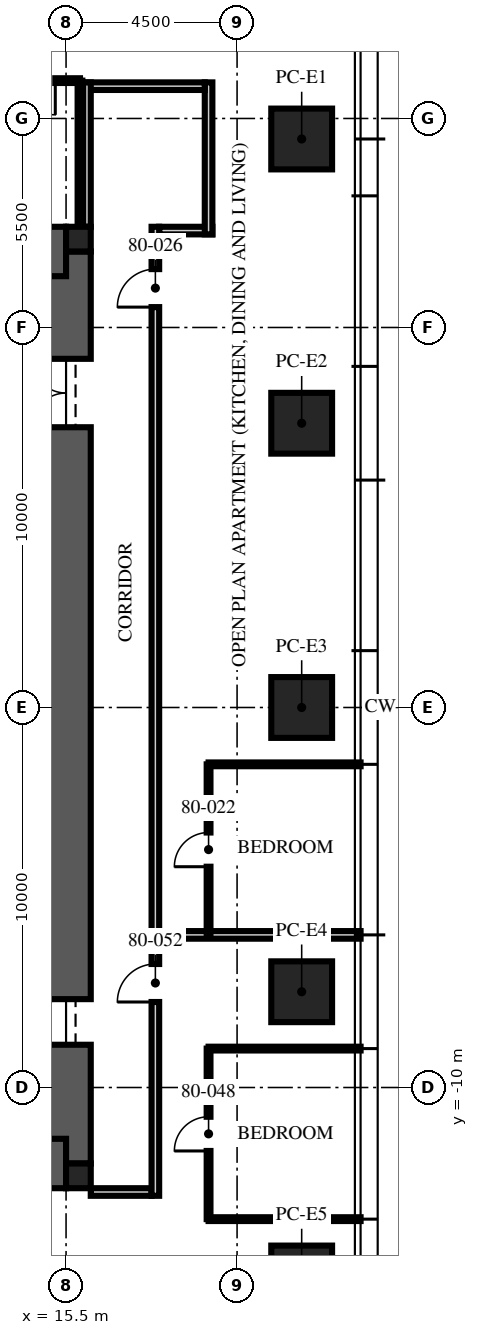
"""IFC4 building model, lengths in metres.
Left out: names, types, materials, properties, quantities, classifications, styles, units other than length and angle.
Written with IfcOpenShell. Run it as: python <this file> out.ifc"""

import sys

from ifc_helpers import new_model, si_unit, direction, frame, frame_2d, origin, origin_2d, place, context, subcontext, project, spatial, rectangle, extrude, element, fill, save


model = new_model("IFC4")
c1 = context("Model", 3, precision=1e-05, world=origin(), true_north=direction((0.0, 1.0)))
c2 = subcontext(c1, "Body", "Model", "MODEL_VIEW")
j1 = project(units=[si_unit("LENGTHUNIT", "METRE"), si_unit("PLANEANGLEUNIT", "RADIAN")], contexts=[c1])
p1 = place(None, origin())
s1 = spatial("IfcSite", under=j1, at=p1, CompositionType="ELEMENT")
p2 = place(p1, origin())
s2 = spatial("IfcBuilding", under=s1, at=p2, CompositionType="ELEMENT")
p3 = place(p2, frame((0.0, 0.0, 319.5)))
s3 = spatial("IfcBuildingStorey", under=s2, at=p3, CompositionType="ELEMENT", Elevation=319.5)
p4 = place(p3, frame((15.5, -12.0, -0.25), z_axis=(0.0, 0.0, 1.0), x_axis=(0.0, 1.0, 0.0)))
e1 = element("IfcWall", 1, at=p4, inside=s3, PredefinedType="SHEAR", context=c2, shape_type="SweptSolid", body=[
    extrude(rectangle(XDim=24.0, YDim=1.3, at=frame_2d((12.0, 0.0))), origin(), (0.0, 0.0, 1.0), 3.75),
])
p5 = place(p4, frame((3.125, 0.0, 0.25)))
e2 = element("IfcOpeningElement", 2, at=p5, cuts=e1, PredefinedType="OPENING", context=c2, shape_type="SweptSolid", body=[
    extrude(rectangle(XDim=1.2, YDim=2.1, at=frame_2d((0.6, 1.05))), frame((0.0, 0.66, 0.0), z_axis=(0.0, -1.0, 0.0), x_axis=(1.0, 0.0, 0.0)), (0.0, 0.0, 1.0), 1.32),
])
p6 = place(p4, frame((19.375, 0.0, 0.25)))
e3 = element("IfcOpeningElement", 3, at=p6, cuts=e1, PredefinedType="OPENING", context=c2, shape_type="SweptSolid", body=[
    extrude(rectangle(XDim=1.8, YDim=2.1, at=frame_2d((0.9, 1.05))), frame((0.0, 0.66, 0.0), z_axis=(0.0, -1.0, 0.0), x_axis=(1.0, 0.0, 0.0)), (0.0, 0.0, 1.0), 1.32),
])
for number, where, z_axis, x_axis in (
    (4, (-15.5, 12.0, -0.25), (0.0, 0.0, 1.0), (1.0, 0.0, 0.0)),
    (5, (-15.5, -12.0, -0.25), (0.0, 0.0, 1.0), (1.0, 0.0, 0.0)),
):
    element("IfcWall", number, at=place(p3, frame(where, z_axis=z_axis, x_axis=x_axis)), inside=s3, PredefinedType="SHEAR", context=c2, shape_type="SweptSolid", body=[
        extrude(rectangle(XDim=31.0, YDim=1.3, at=frame_2d((15.5, 0.0))), origin(), (0.0, 0.0, 1.0), 3.75),
    ])
for number, where, z_axis, x_axis in (
    (6, (15.825, 12.325, -0.25), (0.0, 0.0, 1.0), (1.0, 0.0, 0.0)),
    (7, (15.825, -12.325, -0.25), (0.0, 0.0, 1.0), (1.0, 0.0, 0.0)),
):
    element("IfcColumn", number, at=place(p3, frame(where, z_axis=z_axis, x_axis=x_axis)), inside=s3, PredefinedType="COLUMN", context=c2, shape_type="SweptSolid", body=[
        extrude(rectangle(XDim=0.65, YDim=0.65, at=origin_2d()), origin(), (0.0, 0.0, 1.0), 3.75),
    ])
for number, where, z_axis, x_axis in (
    (8, (21.7, 14.96, 0.0), (0.0, 0.0, 1.0), (0.0, 1.0, 0.0)),
    (9, (21.7, 7.48, 0.0), (0.0, 0.0, 1.0), (0.0, 1.0, 0.0)),
    (10, (21.7, 0.0, 0.0), (0.0, 0.0, 1.0), (0.0, 1.0, 0.0)),
    (11, (21.7, -7.48, 0.0), (0.0, 0.0, 1.0), (0.0, 1.0, 0.0)),
    (12, (21.7, -14.96, 0.0), (0.0, 0.0, 1.0), (0.0, 1.0, 0.0)),
):
    element("IfcColumn", number, at=place(p3, frame(where, z_axis=z_axis, x_axis=x_axis)), inside=s3, PredefinedType="COLUMN", context=c2, shape_type="SweptSolid", body=[
        extrude(rectangle(XDim=1.6, YDim=1.6, at=origin_2d()), origin(), (0.0, 0.0, 1.0), 3.75),
    ])
p7 = place(p3, frame((17.95, 12.55, 0.0), z_axis=(0.0, 0.0, 1.0), x_axis=(1.0, 0.0, 0.0)))
e13 = element("IfcWall", 13, at=p7, inside=s3, PredefinedType="PARTITIONING", context=c2, shape_type="SweptSolid", body=[
    extrude(rectangle(XDim=1.4, YDim=0.2, at=frame_2d((0.7, 0.0))), origin(), (0.0, 0.0, 1.0), 3.5),
])
p8 = place(p3, frame((19.25, 12.45, 0.0), z_axis=(0.0, 0.0, 1.0), x_axis=(0.0, 1.0, 0.0)))
e14 = element("IfcWall", 14, at=p8, inside=s3, PredefinedType="PARTITIONING", context=c2, shape_type="SweptSolid", body=[
    extrude(rectangle(XDim=4.0, YDim=0.2, at=frame_2d((2.0, 0.0))), origin(), (0.0, 0.0, 1.0), 2.9),
])
p9 = place(p3, frame((19.15, 16.35, 0.0), z_axis=(0.0, 0.0, 1.0), x_axis=(-1.0, 0.0, 0.0)))
e15 = element("IfcWall", 15, at=p9, inside=s3, PredefinedType="PARTITIONING", context=c2, shape_type="SweptSolid", body=[
    extrude(rectangle(XDim=3.2, YDim=0.2, at=frame_2d((1.6, 0.0))), origin(), (0.0, 0.0, 1.0), 2.6),
])
p10 = place(p3, frame((16.05, 16.45, 0.0), z_axis=(0.0, 0.0, 1.0), x_axis=(0.0, -1.0, 0.0)))
e16 = element("IfcWall", 16, at=p10, inside=s3, PredefinedType="PARTITIONING", context=c2, shape_type="SweptSolid", body=[
    extrude(rectangle(XDim=3.8, YDim=0.2, at=frame_2d((1.9, 0.0))), origin(), (0.0, 0.0, 1.0), 2.6),
])
p11 = place(p3, frame((16.15, -12.75, 0.0), z_axis=(0.0, 0.0, 1.0), x_axis=(1.0, 0.0, 0.0)))
e17 = element("IfcWall", 17, at=p11, inside=s3, PredefinedType="PARTITIONING", context=c2, shape_type="SweptSolid", body=[
    extrude(rectangle(XDim=1.6, YDim=0.2, at=frame_2d((0.8, 0.0))), origin(), (0.0, 0.0, 1.0), 2.6),
])
p12 = place(p3, frame((17.95, -5.984, 0.0), z_axis=(0.0, 0.0, 1.0), x_axis=(1.0, 0.0, 0.0)))
e18 = element("IfcWall", 18, at=p12, inside=s3, PredefinedType="PARTITIONING", context=c2, shape_type="SweptSolid", body=[
    extrude(rectangle(XDim=5.3, YDim=0.2, at=frame_2d((2.65, 0.0))), origin(), (0.0, 0.0, 1.0), 3.01),
])
for number, where, z_axis, x_axis in (
    (19, (19.25, -1.496, 0.0), (0.0, 0.0, 1.0), (1.0, 0.0, 0.0)),
    (20, (19.25, -13.464, 0.0), (0.0, 0.0, 1.0), (1.0, 0.0, 0.0)),
    (21, (19.25, -8.976, 0.0), (0.0, 0.0, 1.0), (1.0, 0.0, 0.0)),
):
    element("IfcWall", number, at=place(p3, frame(where, z_axis=z_axis, x_axis=x_axis)), inside=s3, PredefinedType="PARTITIONING", context=c2, shape_type="SweptSolid", body=[
        extrude(rectangle(XDim=4.0, YDim=0.1, at=frame_2d((2.0, 0.0))), origin(), (0.0, 0.0, 1.0), 3.01),
    ])
p13 = place(p3, frame((19.25, -5.984, 0.0), z_axis=(0.0, 0.0, 1.0), x_axis=(0.0, 1.0, 0.0)))
e22 = element("IfcWall", 22, at=p13, inside=s3, PredefinedType="PARTITIONING", context=c2, shape_type="SweptSolid", body=[
    extrude(rectangle(XDim=4.488, YDim=0.1, at=frame_2d((2.244, 0.0))), origin(), (0.0, 0.0, 1.0), 2.91),
])
p14 = place(p13, frame((1.794, 0.0, 0.0)))
e23 = element("IfcOpeningElement", 23, at=p14, cuts=e22, PredefinedType="OPENING", context=c2, shape_type="SweptSolid", body=[
    extrude(rectangle(XDim=0.9, YDim=2.1, at=frame_2d((0.45, 1.05))), frame((0.0, 0.06, 0.0), z_axis=(0.0, -1.0, 0.0), x_axis=(1.0, 0.0, 0.0)), (0.0, 0.0, 1.0), 0.12),
])
p15 = place(p3, frame((15.866, 16.496, 0.0), z_axis=(0.0, 0.0, 1.0), x_axis=(-1.0, 0.0, 0.0)))
e24 = element("IfcWall", 24, at=p15, inside=s3, PredefinedType="PARTITIONING", context=c2, shape_type="SweptSolid", body=[
    extrude(rectangle(XDim=2.2, YDim=0.125, at=frame_2d((1.1, 0.0))), origin(), (0.0, 0.0, 1.0), 2.9),
])
p16 = place(p15, frame((0.65, 0.0, 0.0)))
e25 = element("IfcOpeningElement", 25, at=p16, cuts=e24, PredefinedType="OPENING", context=c2, shape_type="SweptSolid", body=[
    extrude(rectangle(XDim=0.9, YDim=2.1, at=frame_2d((0.45, 1.05))), frame((0.0, 0.073, 0.0), z_axis=(0.0, -1.0, 0.0), x_axis=(1.0, 0.0, 0.0)), (0.0, 0.0, 1.0), 0.145),
])
p17 = place(p3, frame((15.866, 12.65, 0.0), z_axis=(0.0, 0.0, 1.0), x_axis=(0.0, 1.0, 0.0)))
e26 = element("IfcWall", 26, at=p17, inside=s3, PredefinedType="PARTITIONING", context=c2, shape_type="SweptSolid", body=[
    extrude(rectangle(XDim=3.846, YDim=0.125, at=frame_2d((1.923, 0.0))), origin(), (0.0, 0.0, 1.0), 2.6),
])
p18 = place(p3, frame((19.25, -13.464, 0.0), z_axis=(0.0, 0.0, 1.0), x_axis=(0.0, 1.0, 0.0)))
e27 = element("IfcWall", 27, at=p18, inside=s3, PredefinedType="PARTITIONING", context=c2, shape_type="SweptSolid", body=[
    extrude(rectangle(XDim=4.488, YDim=0.1, at=frame_2d((2.244, 0.0))), origin(), (0.0, 0.0, 1.0), 2.91),
])
p19 = place(p18, frame((1.794, 0.0, 0.0)))
e28 = element("IfcOpeningElement", 28, at=p19, cuts=e27, PredefinedType="OPENING", context=c2, shape_type="SweptSolid", body=[
    extrude(rectangle(XDim=0.9, YDim=2.1, at=frame_2d((0.45, 1.05))), frame((0.0, 0.06, 0.0), z_axis=(0.0, -1.0, 0.0), x_axis=(1.0, 0.0, 0.0)), (0.0, 0.0, 1.0), 0.12),
])
p20 = place(p3, frame((17.85, -12.85, 0.0), z_axis=(0.0, 0.0, 1.0), x_axis=(0.0, 1.0, 0.0)))
e29 = element("IfcWall", 29, at=p20, inside=s3, PredefinedType="PARTITIONING", context=c2, shape_type="SweptSolid", body=[
    extrude(rectangle(XDim=25.5, YDim=0.2, at=frame_2d((12.75, 0.0))), origin(), (0.0, 0.0, 1.0), 2.9),
])
p21 = place(p20, frame((23.386, 0.0, 0.0)))
e30 = element("IfcOpeningElement", 30, at=p21, cuts=e29, PredefinedType="OPENING", context=c2, shape_type="SweptSolid", body=[
    extrude(rectangle(XDim=1.0, YDim=2.2, at=frame_2d((0.5, 1.1))), frame((0.0, 0.11, 0.0), z_axis=(0.0, -1.0, 0.0), x_axis=(1.0, 0.0, 0.0)), (0.0, 0.0, 1.0), 0.22),
])
p22 = place(p20, frame((5.1, 0.0, 0.0)))
e31 = element("IfcOpeningElement", 31, at=p22, cuts=e29, PredefinedType="OPENING", context=c2, shape_type="SweptSolid", body=[
    extrude(rectangle(XDim=1.0, YDim=2.2, at=frame_2d((0.5, 1.1))), frame((0.0, 0.11, 0.0), z_axis=(0.0, -1.0, 0.0), x_axis=(1.0, 0.0, 0.0)), (0.0, 0.0, 1.0), 0.22),
])
p23 = place(p5, origin())
e32 = element("IfcDoor", 32, at=p23, inside=s3, OperationType="SINGLE_SWING_LEFT", PredefinedType="DOOR", context=c2, shape_type="SweptSolid", body=[
    extrude(rectangle(XDim=1.2, YDim=2.1, at=frame_2d((0.6, 1.05))), frame((0.0, 0.025, 0.0), z_axis=(0.0, -1.0, 0.0), x_axis=(1.0, 0.0, 0.0)), (0.0, 0.0, 1.0), 0.05),
])
fill(e2, e32)
p24 = place(p6, origin())
e33 = element("IfcDoor", 33, at=p24, inside=s3, OperationType="DOUBLE_DOOR_SINGLE_SWING", PredefinedType="DOOR", context=c2, shape_type="SweptSolid", body=[
    extrude(rectangle(XDim=1.8, YDim=2.1, at=frame_2d((0.9, 1.05))), frame((0.0, 0.025, 0.0), z_axis=(0.0, -1.0, 0.0), x_axis=(1.0, 0.0, 0.0)), (0.0, 0.0, 1.0), 0.05),
])
fill(e3, e33)
p25 = place(p14, origin())
e34 = element("IfcDoor", 34, at=p25, inside=s3, OperationType="SINGLE_SWING_LEFT", PredefinedType="DOOR", context=c2, shape_type="SweptSolid", body=[
    extrude(rectangle(XDim=0.9, YDim=2.1, at=frame_2d((0.45, 1.05))), frame((0.0, 0.025, 0.0), z_axis=(0.0, -1.0, 0.0), x_axis=(1.0, 0.0, 0.0)), (0.0, 0.0, 1.0), 0.05),
])
fill(e23, e34)
p26 = place(p16, origin())
e35 = element("IfcDoor", 35, at=p26, inside=s3, OperationType="SINGLE_SWING_LEFT", PredefinedType="DOOR", context=c2, shape_type="SweptSolid", body=[
    extrude(rectangle(XDim=0.9, YDim=2.1, at=frame_2d((0.45, 1.05))), frame((0.0, 0.025, 0.0), z_axis=(0.0, -1.0, 0.0), x_axis=(1.0, 0.0, 0.0)), (0.0, 0.0, 1.0), 0.05),
])
fill(e25, e35)
p27 = place(p21, origin())
e36 = element("IfcDoor", 36, at=p27, inside=s3, OperationType="SINGLE_SWING_LEFT", PredefinedType="DOOR", context=c2, shape_type="SweptSolid", body=[
    extrude(rectangle(XDim=1.0, YDim=2.2, at=frame_2d((0.5, 1.1))), frame((0.0, 0.025, 0.0), z_axis=(0.0, -1.0, 0.0), x_axis=(1.0, 0.0, 0.0)), (0.0, 0.0, 1.0), 0.05),
])
fill(e30, e36)
p28 = place(p19, origin())
e37 = element("IfcDoor", 37, at=p28, inside=s3, OperationType="SINGLE_SWING_LEFT", PredefinedType="DOOR", context=c2, shape_type="SweptSolid", body=[
    extrude(rectangle(XDim=0.9, YDim=2.1, at=frame_2d((0.45, 1.05))), frame((0.0, 0.025, 0.0), z_axis=(0.0, -1.0, 0.0), x_axis=(1.0, 0.0, 0.0)), (0.0, 0.0, 1.0), 0.05),
])
fill(e28, e37)
p29 = place(p22, origin())
e38 = element("IfcDoor", 38, at=p29, inside=s3, OperationType="SINGLE_SWING_LEFT", PredefinedType="DOOR", context=c2, shape_type="SweptSolid", body=[
    extrude(rectangle(XDim=1.0, YDim=2.2, at=frame_2d((0.5, 1.1))), frame((0.0, 0.025, 0.0), z_axis=(0.0, -1.0, 0.0), x_axis=(1.0, 0.0, 0.0)), (0.0, 0.0, 1.0), 0.05),
])
fill(e31, e38)
save(model, sys.argv[1])
